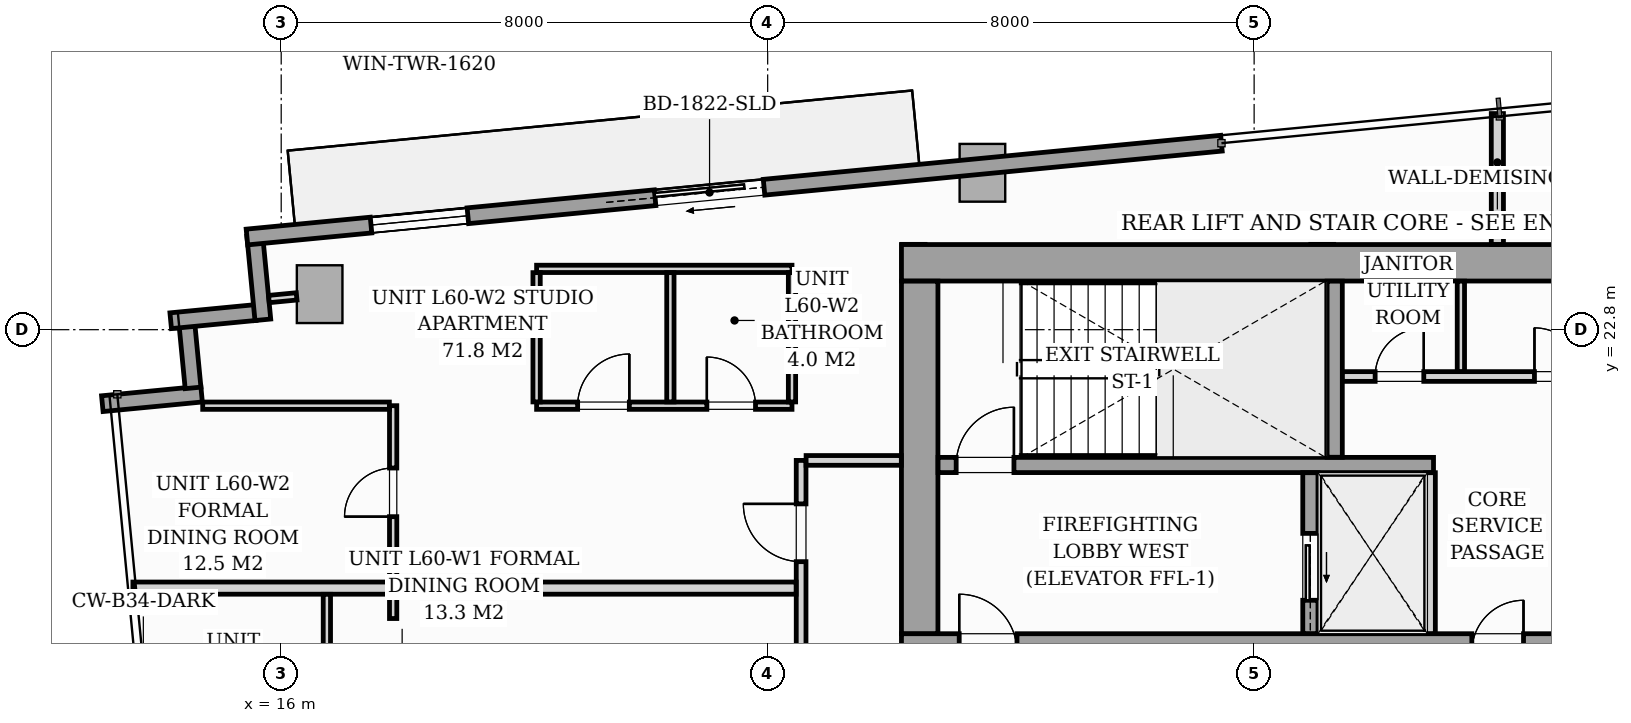
"""IFC4 building model, lengths in metres.
Left out: names, types, materials, properties, quantities, classifications, styles, units other than length and angle.
Written with IfcOpenShell. Run it as: python <this file> out.ifc"""

import sys

from ifc_helpers import new_model, si_unit, direction, frame, frame_2d, origin, origin_2d, place, context, subcontext, project, spatial, rectangle, i_section, extrude, source, transform, mapped, element, fill, save


model = new_model("IFC4")
c1 = context("Model", 3, precision=1e-05, world=origin(), true_north=direction((0.0, 1.0)))
c2 = subcontext(c1, "Body", "Model", "MODEL_VIEW")
j1 = project(units=[si_unit("LENGTHUNIT", "METRE"), si_unit("PLANEANGLEUNIT", "RADIAN")], contexts=[c1])
p1 = place(None, origin())
s1 = spatial("IfcSite", under=j1, at=p1, CompositionType="ELEMENT")
p2 = place(p1, origin())
s2 = spatial("IfcBuilding", under=s1, at=p2, CompositionType="ELEMENT")
p3 = place(p2, frame((0.0, 0.0, 208.2)))
s3 = spatial("IfcBuildingStorey", under=s2, at=p3, CompositionType="ELEMENT", Elevation=208.2)
m1 = source(origin(), c2, "Body", "SweptSolid", [
    extrude(i_section(OverallWidth=0.416, OverallDepth=0.446, WebThickness=0.039, FlangeThickness=0.063, FilletRadius=0.018, at=origin_2d()), origin(), (0.0, 0.0, 1.0), 3.196),
])
for number, where, z_axis, x_axis in (
    (1, (26.4, 24.0, 0.002), (0.0, 0.0, 1.0), (1.0, 0.0, 0.0)),
    (2, (33.12, 24.0, 0.002), (0.0, 0.0, 1.0), (1.0, 0.0, 0.0)),
):
    element("IfcColumn", number, at=place(p3, frame(where, z_axis=z_axis, x_axis=x_axis)), inside=s3, PredefinedType="PILASTER", context=c2, shape_type="MappedRepresentation", body=[
        mapped(m1, transform((0.0, 0.0, 0.0), scale=1.0)),
    ])
m2 = source(origin(), c2, "Body", "SweptSolid", [
    extrude(rectangle(XDim=0.75, YDim=0.95, at=origin_2d()), origin(), (0.0, 0.0, 1.0), 3.194),
])
for number, where, z_axis, x_axis in (
    (3, (16.632, 23.384, 0.002), (0.0, 0.0, 1.0), (0.995, 0.096, 0.0)),
    (4, (27.532, 25.38, 0.002), (0.0, 0.0, 1.0), (0.995, 0.096, 0.0)),
):
    element("IfcColumn", number, at=place(p3, frame(where, z_axis=z_axis, x_axis=x_axis)), inside=s3, PredefinedType="COLUMN", context=c2, shape_type="MappedRepresentation", body=[
        mapped(m2, transform((0.0, 0.0, 0.0), scale=1.0)),
    ])
p4 = place(p3, frame((13.058, 21.583, 0.0), z_axis=(0.0, 0.0, 1.0), x_axis=(0.995394563142, 0.095862733462, 0.0)))
e5 = element("IfcWall", 5, at=p4, inside=s3, PredefinedType="STANDARD", context=c2, shape_type="SweptSolid", body=[
    extrude(rectangle(XDim=1.64, YDim=0.26, at=frame_2d((0.82, 0.0))), origin(), (0.0, 0.0, 1.0), 2.9),
])
p5 = place(p3, frame((14.55, 21.843, 0.0), z_axis=(0.0, 0.0, 1.0), x_axis=(-0.09576095695, 0.995404359607, 0.0)))
e6 = element("IfcWall", 6, at=p5, inside=s3, PredefinedType="STANDARD", context=c2, shape_type="SweptSolid", body=[
    extrude(rectangle(XDim=1.15, YDim=0.26, at=frame_2d((0.575, 0.0))), origin(), (0.0, 0.0, 1.0), 2.9),
])
p6 = place(p3, frame((14.183, 22.947, 0.0), z_axis=(0.0, 0.0, 1.0), x_axis=(0.99540614245, 0.095742423056, 0.0)))
e7 = element("IfcWall", 7, at=p6, inside=s3, PredefinedType="STANDARD", context=c2, shape_type="SweptSolid", body=[
    extrude(rectangle(XDim=1.395, YDim=0.26, at=frame_2d((0.697, 0.0))), origin(), (0.0, 0.0, 1.0), 2.9),
])
p7 = place(p3, frame((15.698, 22.963, 0.0), z_axis=(0.0, 0.0, 1.0), x_axis=(-0.09589913835, 0.995391056452, 0.0)))
e8 = element("IfcWall", 8, at=p7, inside=s3, PredefinedType="STANDARD", context=c2, shape_type="SweptSolid", body=[
    extrude(rectangle(XDim=1.395, YDim=0.26, at=frame_2d((0.698, 0.0))), origin(), (0.0, 0.0, 1.0), 2.9),
])
p8 = place(p3, frame((15.437, 24.324, 0.0), z_axis=(0.0, 0.0, 1.0), x_axis=(0.995395627913, 0.095851676732, 0.0)))
e9 = element("IfcWall", 9, at=p8, inside=s3, PredefinedType="STANDARD", context=c2, shape_type="SweptSolid", body=[
    extrude(rectangle(XDim=16.1, YDim=0.26, at=frame_2d((8.05, 0.0))), origin(), (0.0, 0.0, 1.0), 2.9),
])
p9 = place(p8, frame((6.743, 0.0, 0.0)))
e10 = element("IfcOpeningElement", 10, at=p9, cuts=e9, PredefinedType="OPENING", context=c2, shape_type="SweptSolid", body=[
    extrude(rectangle(XDim=1.8, YDim=2.06, at=frame_2d((0.9, 1.03))), frame((0.0, 0.14, 0.0), z_axis=(0.0, -1.0, 0.0), x_axis=(1.0, 0.0, 0.0)), (0.0, 0.0, 1.0), 0.28),
])
p10 = place(p8, frame((2.05, 0.0, 0.65)))
e11 = element("IfcOpeningElement", 11, at=p10, cuts=e9, PredefinedType="OPENING", context=c2, shape_type="SweptSolid", body=[
    extrude(rectangle(XDim=1.6, YDim=1.5, at=frame_2d((0.8, 0.75))), frame((0.0, 0.14, 0.0), z_axis=(0.0, -1.0, 0.0), x_axis=(1.0, 0.0, 0.0)), (0.0, 0.0, 1.0), 0.28),
])
p11 = place(p3, frame((26.2, 17.5, 0.0), z_axis=(0.0, 0.0, 1.0), x_axis=(1.0, 0.0, 0.0)))
e12 = element("IfcWall", 12, at=p11, inside=s3, PredefinedType="SHEAR", context=c2, shape_type="SweptSolid", body=[
    extrude(rectangle(XDim=19.6, YDim=0.6, at=frame_2d((9.8, 0.0))), origin(), (0.0, 0.0, 1.0), 3.2),
])
p12 = place(p11, frame((0.95, 0.0, 0.0)))
e13 = element("IfcOpeningElement", 13, at=p12, cuts=e12, PredefinedType="OPENING", context=c2, shape_type="SweptSolid", body=[
    extrude(rectangle(XDim=0.95, YDim=2.06, at=frame_2d((0.475, 1.03))), frame((0.0, 0.31, 0.0), z_axis=(0.0, -1.0, 0.0), x_axis=(1.0, 0.0, 0.0)), (0.0, 0.0, 1.0), 0.62),
])
p13 = place(p11, frame((9.38, 0.0, 0.0)))
e14 = element("IfcOpeningElement", 14, at=p13, cuts=e12, PredefinedType="OPENING", context=c2, shape_type="SweptSolid", body=[
    extrude(rectangle(XDim=0.85, YDim=2.0, at=frame_2d((0.425, 1.0))), frame((0.0, 0.31, 0.0), z_axis=(0.0, -1.0, 0.0), x_axis=(1.0, 0.0, 0.0)), (0.0, 0.0, 1.0), 0.62),
])
p14 = place(p11, frame((17.55, 0.0, 0.0)))
e15 = element("IfcOpeningElement", 15, at=p14, cuts=e12, PredefinedType="OPENING", context=c2, shape_type="SweptSolid", body=[
    extrude(rectangle(XDim=0.95, YDim=2.06, at=frame_2d((0.475, 1.03))), frame((0.0, 0.31, 0.0), z_axis=(0.0, -1.0, 0.0), x_axis=(1.0, 0.0, 0.0)), (0.0, 0.0, 1.0), 0.62),
])
p15 = place(p3, frame((26.2, 23.9, 0.0), z_axis=(0.0, 0.0, 1.0), x_axis=(1.0, 0.0, 0.0)))
e16 = element("IfcWall", 16, at=p15, inside=s3, PredefinedType="SHEAR", context=c2, shape_type="SweptSolid", body=[
    extrude(rectangle(XDim=19.6, YDim=0.6, at=frame_2d((9.8, 0.0))), origin(), (0.0, 0.0, 1.0), 3.2),
])
p16 = place(p3, frame((26.5, 17.802, 0.0), z_axis=(0.0, 0.0, 1.0), x_axis=(0.0, 1.0, 0.0)))
e17 = element("IfcWall", 17, at=p16, inside=s3, PredefinedType="SHEAR", context=c2, shape_type="SweptSolid", body=[
    extrude(rectangle(XDim=5.796, YDim=0.6, at=frame_2d((2.898, 0.0))), origin(), (0.0, 0.0, 1.0), 3.2),
])
p17 = place(p3, frame((26.802, 20.575, 0.0), z_axis=(0.0, 0.0, 1.0), x_axis=(1.0, 0.0, 0.0)))
e18 = element("IfcWall", 18, at=p17, inside=s3, PredefinedType="SOLIDWALL", context=c2, shape_type="SweptSolid", body=[
    extrude(rectangle(XDim=8.148, YDim=0.25, at=frame_2d((4.074, 0.0))), origin(), (0.0, 0.0, 1.0), 3.2),
])
p18 = place(p17, frame((0.298, 0.0, 0.0)))
e19 = element("IfcOpeningElement", 19, at=p18, cuts=e18, PredefinedType="OPENING", context=c2, shape_type="SweptSolid", body=[
    extrude(rectangle(XDim=0.95, YDim=2.06, at=frame_2d((0.475, 1.03))), frame((0.0, 0.135, 0.0), z_axis=(0.0, -1.0, 0.0), x_axis=(1.0, 0.0, 0.0)), (0.0, 0.0, 1.0), 0.27),
])
p19 = place(p3, frame((33.325, 20.702, 0.0), z_axis=(0.0, 0.0, 1.0), x_axis=(0.0, 1.0, 0.0)))
e20 = element("IfcWall", 20, at=p19, inside=s3, PredefinedType="SOLIDWALL", context=c2, shape_type="SweptSolid", body=[
    extrude(rectangle(XDim=2.896, YDim=0.25, at=frame_2d((1.448, 0.0))), origin(), (0.0, 0.0, 1.0), 3.2),
])
p20 = place(p3, frame((32.925, 17.802, 0.0), z_axis=(0.0, 0.0, 1.0), x_axis=(0.0, 1.0, 0.0)))
e21 = element("IfcWall", 21, at=p20, inside=s3, PredefinedType="SOLIDWALL", context=c2, shape_type="SweptSolid", body=[
    extrude(rectangle(XDim=2.646, YDim=0.25, at=frame_2d((1.323, 0.0))), origin(), (0.0, 0.0, 1.0), 3.2),
])
p21 = place(p20, frame((0.548, 0.0, 0.0)))
e22 = element("IfcOpeningElement", 22, at=p21, cuts=e21, PredefinedType="OPENING", context=c2, shape_type="SweptSolid", body=[
    extrude(rectangle(XDim=1.1, YDim=2.08, at=frame_2d((0.55, 1.04))), frame((0.0, 0.135, 0.0), z_axis=(0.0, -1.0, 0.0), x_axis=(1.0, 0.0, 0.0)), (0.0, 0.0, 1.0), 0.27),
])
p22 = place(p3, frame((34.9, 17.802, 0.0), z_axis=(0.0, 0.0, 1.0), x_axis=(0.0, 1.0, 0.0)))
e23 = element("IfcWall", 23, at=p22, inside=s3, PredefinedType="PARTITIONING", context=c2, shape_type="SweptSolid", body=[
    extrude(rectangle(XDim=2.646, YDim=0.16, at=frame_2d((1.323, 0.0))), origin(), (0.0, 0.0, 1.0), 2.9),
])
p23 = place(p3, frame((33.452, 22.03, 0.0), z_axis=(0.0, 0.0, 1.0), x_axis=(1.0, 0.0, 0.0)))
e24 = element("IfcWall", 24, at=p23, inside=s3, PredefinedType="PARTITIONING", context=c2, shape_type="SweptSolid", body=[
    extrude(rectangle(XDim=5.096, YDim=0.16, at=frame_2d((2.548, 0.0))), origin(), (0.0, 0.0, 1.0), 2.9),
])
p24 = place(p23, frame((0.538, 0.0, 0.0)))
e25 = element("IfcOpeningElement", 25, at=p24, cuts=e24, PredefinedType="OPENING", context=c2, shape_type="SweptSolid", body=[
    extrude(rectangle(XDim=0.8, YDim=2.05, at=frame_2d((0.4, 1.025))), frame((0.0, 0.09, 0.0), z_axis=(0.0, -1.0, 0.0), x_axis=(1.0, 0.0, 0.0)), (0.0, 0.0, 1.0), 0.18),
])
p25 = place(p23, frame((3.158, 0.0, 0.0)))
e26 = element("IfcOpeningElement", 26, at=p25, cuts=e24, PredefinedType="OPENING", context=c2, shape_type="SweptSolid", body=[
    extrude(rectangle(XDim=0.8, YDim=2.05, at=frame_2d((0.4, 1.025))), frame((0.0, 0.09, 0.0), z_axis=(0.0, -1.0, 0.0), x_axis=(1.0, 0.0, 0.0)), (0.0, 0.0, 1.0), 0.18),
])
p26 = place(p3, frame((35.4, 22.112, 0.0), z_axis=(0.0, 0.0, 1.0), x_axis=(0.0, 1.0, 0.0)))
e27 = element("IfcWall", 27, at=p26, inside=s3, PredefinedType="PARTITIONING", context=c2, shape_type="SweptSolid", body=[
    extrude(rectangle(XDim=1.486, YDim=0.12, at=frame_2d((0.743, 0.0))), origin(), (0.0, 0.0, 1.0), 2.9),
])
p27 = place(p3, frame((24.55, 13.362, 0.0), z_axis=(0.0, 0.0, 1.0), x_axis=(0.0, 1.0, 0.0)))
e28 = element("IfcWall", 28, at=p27, inside=s3, PredefinedType="PARTITIONING", context=c2, shape_type="SweptSolid", body=[
    extrude(rectangle(XDim=7.288, YDim=0.16, at=frame_2d((3.644, 0.0))), origin(), (0.0, 0.0, 1.0), 2.9),
])
p28 = place(p27, frame((0.493, 0.0, 0.0)))
e29 = element("IfcOpeningElement", 29, at=p28, cuts=e28, PredefinedType="OPENING", context=c2, shape_type="SweptSolid", body=[
    extrude(rectangle(XDim=0.85, YDim=2.0, at=frame_2d((0.425, 1.0))), frame((0.0, 0.09, 0.0), z_axis=(0.0, -1.0, 0.0), x_axis=(1.0, 0.0, 0.0)), (0.0, 0.0, 1.0), 0.18),
])
p29 = place(p27, frame((5.623, 0.0, 0.0)))
e30 = element("IfcOpeningElement", 30, at=p29, cuts=e28, PredefinedType="OPENING", context=c2, shape_type="SweptSolid", body=[
    extrude(rectangle(XDim=0.95, YDim=2.06, at=frame_2d((0.475, 1.03))), frame((0.0, 0.09, 0.0), z_axis=(0.0, -1.0, 0.0), x_axis=(1.0, 0.0, 0.0)), (0.0, 0.0, 1.0), 0.18),
])
p30 = place(p3, frame((36.0, 24.202, 0.0), z_axis=(0.0, 0.0, 1.0), x_axis=(0.0, 1.0, 0.0)))
e31 = element("IfcWall", 31, at=p30, inside=s3, PredefinedType="PARTITIONING", context=c2, shape_type="SweptSolid", body=[
    extrude(rectangle(XDim=2.152, YDim=0.2, at=frame_2d((1.076, 0.0))), origin(), (0.0, 0.0, 1.0), 2.9),
])
p31 = place(p3, frame((24.632, 20.65, 0.0), z_axis=(0.0, 0.0, 1.0), x_axis=(1.0, 0.0, 0.0)))
e32 = element("IfcWall", 32, at=p31, inside=s3, PredefinedType="PARTITIONING", context=c2, shape_type="SweptSolid", body=[
    extrude(rectangle(XDim=1.566, YDim=0.16, at=frame_2d((0.783, 0.0))), origin(), (0.0, 0.0, 1.0), 2.9),
])
p32 = place(p3, frame((13.561, 18.55, 0.0), z_axis=(0.0, 0.0, 1.0), x_axis=(1.0, 0.0, 0.0)))
e33 = element("IfcWall", 33, at=p32, inside=s3, PredefinedType="PARTITIONING", context=c2, shape_type="SweptSolid", body=[
    extrude(rectangle(XDim=10.907, YDim=0.2, at=frame_2d((5.453, 0.0))), origin(), (0.0, 0.0, 1.0), 2.9),
])
p33 = place(p3, frame((16.751, 7.615, 0.0), z_axis=(0.0, 0.0, 1.0), x_axis=(0.0, 1.0, 0.0)))
e34 = element("IfcWall", 34, at=p33, inside=s3, PredefinedType="PARTITIONING", context=c2, shape_type="SweptSolid", body=[
    extrude(rectangle(XDim=10.833, YDim=0.12, at=frame_2d((5.417, 0.0))), origin(), (0.0, 0.0, 1.0), 2.9),
])
p34 = place(p33, frame((4.849, 0.0, 0.0)))
e35 = element("IfcOpeningElement", 35, at=p34, cuts=e34, PredefinedType="OPENING", context=c2, shape_type="SweptSolid", body=[
    extrude(rectangle(XDim=0.85, YDim=2.05, at=frame_2d((0.425, 1.025))), frame((0.0, 0.07, 0.0), z_axis=(0.0, -1.0, 0.0), x_axis=(1.0, 0.0, 0.0)), (0.0, 0.0, 1.0), 0.14),
])
p35 = place(p3, frame((20.2, 21.55, 0.0), z_axis=(0.0, 0.0, 1.0), x_axis=(1.0, 0.0, 0.0)))
e36 = element("IfcWall", 36, at=p35, inside=s3, PredefinedType="PARTITIONING", context=c2, shape_type="SweptSolid", body=[
    extrude(rectangle(XDim=4.2, YDim=0.12, at=frame_2d((2.1, 0.0))), origin(), (0.0, 0.0, 1.0), 2.9),
])
p36 = place(p35, frame((0.675, 0.0, 0.0)))
e37 = element("IfcOpeningElement", 37, at=p36, cuts=e36, PredefinedType="OPENING", context=c2, shape_type="SweptSolid", body=[
    extrude(rectangle(XDim=0.85, YDim=2.05, at=frame_2d((0.425, 1.025))), frame((0.0, 0.07, 0.0), z_axis=(0.0, -1.0, 0.0), x_axis=(1.0, 0.0, 0.0)), (0.0, 0.0, 1.0), 0.14),
])
p37 = place(p35, frame((2.8, 0.0, 0.0)))
e38 = element("IfcOpeningElement", 38, at=p37, cuts=e36, PredefinedType="OPENING", context=c2, shape_type="SweptSolid", body=[
    extrude(rectangle(XDim=0.8, YDim=2.02, at=frame_2d((0.4, 1.01))), frame((0.0, 0.07, 0.0), z_axis=(0.0, -1.0, 0.0), x_axis=(1.0, 0.0, 0.0)), (0.0, 0.0, 1.0), 0.14),
])
p38 = place(p3, frame((20.2, 23.8, 0.0), z_axis=(0.0, 0.0, 1.0), x_axis=(1.0, 0.0, 0.0)))
e39 = element("IfcWall", 39, at=p38, inside=s3, PredefinedType="PARTITIONING", context=c2, shape_type="SweptSolid", body=[
    extrude(rectangle(XDim=4.2, YDim=0.12, at=frame_2d((2.1, 0.0))), origin(), (0.0, 0.0, 1.0), 2.26),
])
for number, where, z_axis, x_axis in (
    (40, (20.2, 21.612, 0.0), (0.0, 0.0, 1.0), (0.0, 1.0, 0.0)),
    (41, (22.4, 21.612, 0.0), (0.0, 0.0, 1.0), (0.0, 1.0, 0.0)),
    (42, (24.4, 21.612, 0.0), (0.0, 0.0, 1.0), (0.0, 1.0, 0.0)),
):
    element("IfcWall", number, at=place(p3, frame(where, z_axis=z_axis, x_axis=x_axis)), inside=s3, PredefinedType="PARTITIONING", context=c2, shape_type="SweptSolid", body=[
        extrude(rectangle(XDim=2.126, YDim=0.12, at=frame_2d((1.063, 0.0))), origin(), (0.0, 0.0, 1.0), 2.9),
    ])
p39 = place(p3, frame((17.841, 18.05, 0.0), z_axis=(0.0, 0.0, 1.0), x_axis=(0.0, 1.0, 0.0)))
e43 = element("IfcWall", 43, at=p39, inside=s3, PredefinedType="PARTITIONING", context=c2, shape_type="SweptSolid", body=[
    extrude(rectangle(XDim=0.398, YDim=0.12, at=frame_2d((0.199, 0.0))), origin(), (0.0, 0.0, 1.0), 2.9),
])
p40 = place(p3, frame((17.841, 18.652, 0.0), z_axis=(0.0, 0.0, 1.0), x_axis=(0.0, 1.0, 0.0)))
e44 = element("IfcWall", 44, at=p40, inside=s3, PredefinedType="PARTITIONING", context=c2, shape_type="SweptSolid", body=[
    extrude(rectangle(XDim=2.898, YDim=0.12, at=frame_2d((1.449, 0.0))), origin(), (0.0, 0.0, 1.0), 2.9),
])
p41 = place(p40, frame((1.073, 0.0, 0.0)))
e45 = element("IfcOpeningElement", 45, at=p41, cuts=e44, PredefinedType="OPENING", context=c2, shape_type="SweptSolid", body=[
    extrude(rectangle(XDim=0.8, YDim=2.0, at=frame_2d((0.4, 1.0))), frame((0.0, 0.07, 0.0), z_axis=(0.0, -1.0, 0.0), x_axis=(1.0, 0.0, 0.0)), (0.0, 0.0, 1.0), 0.14),
])
p42 = place(p3, frame((14.709, 21.55, 0.0), z_axis=(0.0, 0.0, 1.0), x_axis=(1.0, 0.0, 0.0)))
e46 = element("IfcWall", 46, at=p42, inside=s3, PredefinedType="PARTITIONING", context=c2, shape_type="SweptSolid", body=[
    extrude(rectangle(XDim=3.07, YDim=0.12, at=frame_2d((1.535, 0.0))), origin(), (0.0, 0.0, 1.0), 2.9),
])
p43 = place(p3, frame((16.254, 23.348, 0.0), z_axis=(0.0, 0.0, 1.0), x_axis=(-0.995384576284, -0.09596637586, 0.0)))
e47 = element("IfcWall", 47, at=p43, inside=s3, PredefinedType="PARTITIONING", context=c2, shape_type="SweptSolid", body=[
    extrude(rectangle(XDim=0.458, YDim=0.12, at=frame_2d((0.229, 0.0))), origin(), (0.0, 0.0, 1.0), 2.9),
])
m3 = source(origin(), c2, "Body", "SweptSolid", [
    extrude(rectangle(XDim=1.8, YDim=2.06, at=frame_2d((0.9, 1.03))), frame((0.0, 0.025, 0.0), z_axis=(0.0, -1.0, 0.0), x_axis=(1.0, 0.0, 0.0)), (0.0, 0.0, 1.0), 0.05),
])
p44 = place(p9, origin())
e48 = element("IfcDoor", 48, at=p44, inside=s3, OperationType="SLIDING_TO_LEFT", PredefinedType="DOOR", context=c2, shape_type="MappedRepresentation", body=[
    mapped(m3, transform((0.0, 0.0, 0.0), scale=1.0)),
])
fill(e10, e48)
m4 = source(origin(), c2, "Body", "SweptSolid", [
    extrude(rectangle(XDim=1.6, YDim=1.5, at=frame_2d((0.8, 0.75))), frame((0.0, 0.03, 0.0), z_axis=(0.0, -1.0, 0.0), x_axis=(1.0, 0.0, 0.0)), (0.0, 0.0, 1.0), 0.06),
])
p45 = place(p10, origin())
e49 = element("IfcWindow", 49, at=p45, inside=s3, PartitioningType="SINGLE_PANEL", PredefinedType="WINDOW", context=c2, shape_type="MappedRepresentation", body=[
    mapped(m4, transform((0.0, 0.0, 0.0), scale=1.0)),
])
fill(e11, e49)
m5 = source(origin(), c2, "Body", "SweptSolid", [
    extrude(rectangle(XDim=0.95, YDim=2.06, at=frame_2d((0.475, 1.03))), frame((0.0, 0.025, 0.0), z_axis=(0.0, -1.0, 0.0), x_axis=(1.0, 0.0, 0.0)), (0.0, 0.0, 1.0), 0.05),
])
p46 = place(p18, origin())
e50 = element("IfcDoor", 50, at=p46, inside=s3, OperationType="SINGLE_SWING_RIGHT", PredefinedType="DOOR", context=c2, shape_type="MappedRepresentation", body=[
    mapped(m5, transform((0.0, 0.0, 0.0), scale=1.0)),
])
fill(e19, e50)
m6 = source(origin(), c2, "Body", "SweptSolid", [
    extrude(rectangle(XDim=1.1, YDim=2.08, at=frame_2d((0.55, 1.04))), frame((0.0, 0.025, 0.0), z_axis=(0.0, -1.0, 0.0), x_axis=(1.0, 0.0, 0.0)), (0.0, 0.0, 1.0), 0.05),
])
p47 = place(p21, origin())
e51 = element("IfcDoor", 51, at=p47, inside=s3, OperationType="SLIDING_TO_LEFT", PredefinedType="DOOR", context=c2, shape_type="MappedRepresentation", body=[
    mapped(m6, transform((0.0, 0.0, 0.0), scale=1.0)),
])
fill(e22, e51)
m7 = source(origin(), c2, "Body", "SweptSolid", [
    extrude(rectangle(XDim=0.8, YDim=2.05, at=frame_2d((0.4, 1.025))), frame((0.0, 0.025, 0.0), z_axis=(0.0, -1.0, 0.0), x_axis=(1.0, 0.0, 0.0)), (0.0, 0.0, 1.0), 0.05),
])
p48 = place(p24, origin())
e52 = element("IfcDoor", 52, at=p48, inside=s3, OperationType="SINGLE_SWING_RIGHT", PredefinedType="DOOR", context=c2, shape_type="MappedRepresentation", body=[
    mapped(m7, transform((0.0, 0.0, 0.0), scale=1.0)),
])
fill(e25, e52)
p49 = place(p25, origin())
e53 = element("IfcDoor", 53, at=p49, inside=s3, OperationType="SINGLE_SWING_LEFT", PredefinedType="DOOR", context=c2, shape_type="MappedRepresentation", body=[
    mapped(m7, transform((0.0, 0.0, 0.0), scale=1.0)),
])
fill(e26, e53)
m8 = source(origin(), c2, "Body", "SweptSolid", [
    extrude(rectangle(XDim=0.95, YDim=2.06, at=frame_2d((0.475, 1.03))), frame((0.0, 0.025, 0.0), z_axis=(0.0, -1.0, 0.0), x_axis=(1.0, 0.0, 0.0)), (0.0, 0.0, 1.0), 0.05),
])
p50 = place(p29, origin())
e54 = element("IfcDoor", 54, at=p50, inside=s3, OperationType="SINGLE_SWING_RIGHT", PredefinedType="DOOR", context=c2, shape_type="MappedRepresentation", body=[
    mapped(m8, transform((0.0, 0.0, 0.0), scale=1.0)),
])
fill(e30, e54)
m9 = source(origin(), c2, "Body", "SweptSolid", [
    extrude(rectangle(XDim=0.8, YDim=2.0, at=frame_2d((0.4, 1.0))), frame((0.0, 0.025, 0.0), z_axis=(0.0, -1.0, 0.0), x_axis=(1.0, 0.0, 0.0)), (0.0, 0.0, 1.0), 0.05),
])
p51 = place(p41, origin())
e55 = element("IfcDoor", 55, at=p51, inside=s3, OperationType="SINGLE_SWING_LEFT", PredefinedType="DOOR", context=c2, shape_type="MappedRepresentation", body=[
    mapped(m9, transform((0.0, 0.0, 0.0), scale=1.0)),
])
fill(e45, e55)
m10 = source(origin(), c2, "Body", "SweptSolid", [
    extrude(rectangle(XDim=0.85, YDim=2.05, at=frame_2d((0.425, 1.025))), frame((0.0, 0.025, 0.0), z_axis=(0.0, -1.0, 0.0), x_axis=(1.0, 0.0, 0.0)), (0.0, 0.0, 1.0), 0.05),
])
p52 = place(p36, origin())
e56 = element("IfcDoor", 56, at=p52, inside=s3, OperationType="SINGLE_SWING_RIGHT", PredefinedType="DOOR", context=c2, shape_type="MappedRepresentation", body=[
    mapped(m10, transform((0.0, 0.0, 0.0), scale=1.0)),
])
fill(e37, e56)
m11 = source(origin(), c2, "Body", "SweptSolid", [
    extrude(rectangle(XDim=0.8, YDim=2.02, at=frame_2d((0.4, 1.01))), frame((0.0, 0.025, 0.0), z_axis=(0.0, -1.0, 0.0), x_axis=(1.0, 0.0, 0.0)), (0.0, 0.0, 1.0), 0.05),
])
p53 = place(p37, origin())
e57 = element("IfcDoor", 57, at=p53, inside=s3, OperationType="SINGLE_SWING_LEFT", PredefinedType="DOOR", context=c2, shape_type="MappedRepresentation", body=[
    mapped(m11, transform((0.0, 0.0, 0.0), scale=1.0)),
])
fill(e38, e57)
save(model, sys.argv[1])
